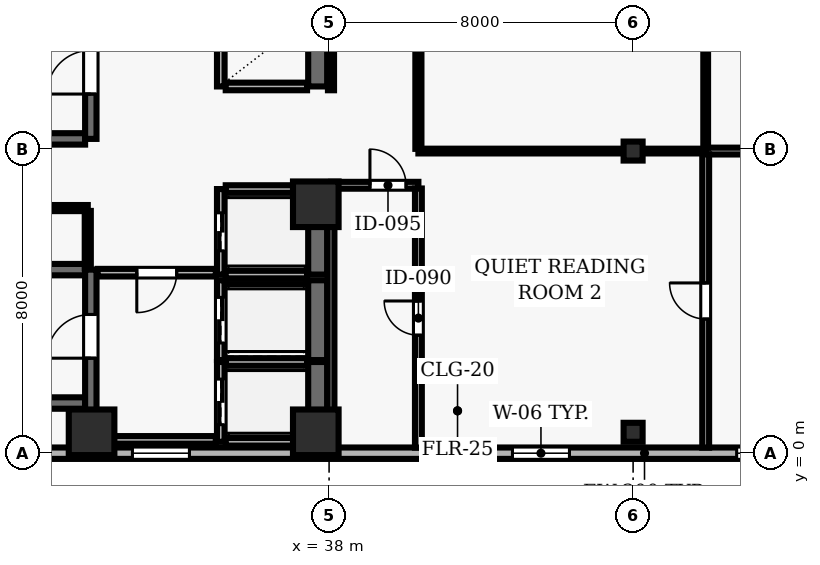
"""IFC4 building model, lengths in metres.
Left out: names, types, materials, properties, quantities, classifications, styles, units other than length and angle.
Written with IfcOpenShell. Run it as: python <this file> out.ifc"""

import sys

from ifc_helpers import new_model, si_unit, direction, frame, frame_2d, origin, origin_2d, place, context, subcontext, project, spatial, rectangle, hollow_rectangle, extrude, element, fill, save


model = new_model("IFC4")
c1 = context("Model", 3, precision=1e-05, world=origin(), true_north=direction((0.0, 1.0)))
c2 = subcontext(c1, "Body", "Model", "MODEL_VIEW")
j1 = project(units=[si_unit("LENGTHUNIT", "METRE"), si_unit("PLANEANGLEUNIT", "RADIAN")], contexts=[c1])
p1 = place(None, origin())
s1 = spatial("IfcSite", under=j1, at=p1, CompositionType="ELEMENT")
p2 = place(p1, origin())
s2 = spatial("IfcBuilding", under=s1, at=p2, CompositionType="ELEMENT")
p3 = place(p2, frame((0.0, 0.0, 122.9)))
s3 = spatial("IfcBuildingStorey", under=s2, at=p3, CompositionType="ELEMENT", Elevation=122.9)
for number, where, z_axis, x_axis in (
    (1, (31.75, 0.55, 0.0), (0.0, 0.0, 1.0), (1.0, 0.0, 0.0)),
    (2, (37.65, 0.55, 0.0), (0.0, 0.0, 1.0), (1.0, 0.0, 0.0)),
    (3, (37.65, 6.55, 0.0), (0.0, 0.0, 1.0), (1.0, 0.0, 0.0)),
):
    element("IfcColumn", number, at=place(p3, frame(where, z_axis=z_axis, x_axis=x_axis)), inside=s3, PredefinedType="COLUMN", context=c2, shape_type="SweptSolid", body=[
        extrude(rectangle(XDim=1.2, YDim=1.2, at=origin_2d()), origin(), (0.0, 0.0, 1.0), 3.9),
    ])
for number, where, z_axis, x_axis in (
    (4, (46.0, 0.55, 0.0), (0.0, 0.0, 1.0), (1.0, 0.0, 0.0)),
    (5, (46.0, 7.95, 0.0), (0.0, 0.0, 1.0), (1.0, 0.0, 0.0)),
):
    element("IfcColumn", number, at=place(p3, frame(where, z_axis=z_axis, x_axis=x_axis)), inside=s3, PredefinedType="COLUMN", context=c2, shape_type="SweptSolid", body=[
        extrude(hollow_rectangle(XDim=0.5, YDim=0.5, WallThickness=0.025, at=origin_2d()), origin(), (0.0, 0.0, 1.0), 3.9),
    ])
p4 = place(p3, frame((24.5, 0.0, 0.0), z_axis=(0.0, 0.0, 1.0), x_axis=(1.0, 0.0, 0.0)))
e6 = element("IfcWall", 6, at=p4, inside=s3, PredefinedType="SOLIDWALL", context=c2, shape_type="SweptSolid", body=[
    extrude(rectangle(XDim=43.6, YDim=0.3, at=frame_2d((21.8, 0.0))), origin(), (0.0, 0.0, 1.0), 3.69),
])
p5 = place(p4, frame((1.975, 0.0, 0.9)))
e7 = element("IfcOpeningElement", 7, at=p5, cuts=e6, PredefinedType="OPENING", context=c2, shape_type="SweptSolid", body=[
    extrude(rectangle(XDim=1.5, YDim=1.8, at=frame_2d((0.75, 0.9))), frame((0.0, 0.16, 0.0), z_axis=(0.0, -1.0, 0.0), x_axis=(1.0, 0.0, 0.0)), (0.0, 0.0, 1.0), 0.32),
])
p6 = place(p4, frame((8.325, 0.0, 0.9)))
e8 = element("IfcOpeningElement", 8, at=p6, cuts=e6, PredefinedType="OPENING", context=c2, shape_type="SweptSolid", body=[
    extrude(rectangle(XDim=1.5, YDim=1.8, at=frame_2d((0.75, 0.9))), frame((0.0, 0.16, 0.0), z_axis=(0.0, -1.0, 0.0), x_axis=(1.0, 0.0, 0.0)), (0.0, 0.0, 1.0), 0.32),
])
p7 = place(p4, frame((18.325, 0.0, 0.9)))
e9 = element("IfcOpeningElement", 9, at=p7, cuts=e6, PredefinedType="OPENING", context=c2, shape_type="SweptSolid", body=[
    extrude(rectangle(XDim=1.5, YDim=1.8, at=frame_2d((0.75, 0.9))), frame((0.0, 0.16, 0.0), z_axis=(0.0, -1.0, 0.0), x_axis=(1.0, 0.0, 0.0)), (0.0, 0.0, 1.0), 0.32),
])
p8 = place(p4, frame((24.225, 0.0, 0.9)))
e10 = element("IfcOpeningElement", 10, at=p8, cuts=e6, PredefinedType="OPENING", context=c2, shape_type="SweptSolid", body=[
    extrude(rectangle(XDim=1.5, YDim=1.8, at=frame_2d((0.75, 0.9))), frame((0.0, 0.16, 0.0), z_axis=(0.0, -1.0, 0.0), x_axis=(1.0, 0.0, 0.0)), (0.0, 0.0, 1.0), 0.32),
])
p9 = place(p4, frame((29.225, 0.0, 0.9)))
e11 = element("IfcOpeningElement", 11, at=p9, cuts=e6, PredefinedType="OPENING", context=c2, shape_type="SweptSolid", body=[
    extrude(rectangle(XDim=1.5, YDim=1.8, at=frame_2d((0.75, 0.9))), frame((0.0, 0.16, 0.0), z_axis=(0.0, -1.0, 0.0), x_axis=(1.0, 0.0, 0.0)), (0.0, 0.0, 1.0), 0.32),
])
p10 = place(p4, frame((34.675, 0.0, 0.9)))
e12 = element("IfcOpeningElement", 12, at=p10, cuts=e6, PredefinedType="OPENING", context=c2, shape_type="SweptSolid", body=[
    extrude(rectangle(XDim=1.5, YDim=1.8, at=frame_2d((0.75, 0.9))), frame((0.0, 0.16, 0.0), z_axis=(0.0, -1.0, 0.0), x_axis=(1.0, 0.0, 0.0)), (0.0, 0.0, 1.0), 0.32),
])
p11 = place(p4, frame((40.125, 0.0, 0.9)))
e13 = element("IfcOpeningElement", 13, at=p11, cuts=e6, PredefinedType="OPENING", context=c2, shape_type="SweptSolid", body=[
    extrude(rectangle(XDim=1.5, YDim=1.8, at=frame_2d((0.75, 0.9))), frame((0.0, 0.16, 0.0), z_axis=(0.0, -1.0, 0.0), x_axis=(1.0, 0.0, 0.0)), (0.0, 0.0, 1.0), 0.32),
])
for number, where, z_axis, x_axis in (
    (14, (31.58, 4.83, 0.0), (0.0, 0.0, 1.0), (-1.0, 0.0, 0.0)),
    (15, (23.22, 1.32, 0.0), (0.0, 0.0, 1.0), (1.0, 0.0, 0.0)),
):
    element("IfcWall", number, at=place(p3, frame(where, z_axis=z_axis, x_axis=x_axis)), inside=s3, PredefinedType="SHEAR", context=c2, shape_type="SweptSolid", body=[
        extrude(rectangle(XDim=8.36, YDim=0.3, at=frame_2d((4.18, 0.0))), origin(), (0.0, 0.0, 1.0), 3.69),
    ])
p12 = place(p3, frame((31.73, 0.96, 0.0), z_axis=(0.0, 0.0, 1.0), x_axis=(0.0, 1.0, 0.0)))
e16 = element("IfcWall", 16, at=p12, inside=s3, PredefinedType="SHEAR", context=c2, shape_type="SweptSolid", body=[
    extrude(rectangle(XDim=3.87, YDim=0.3, at=frame_2d((1.935, 0.0))), origin(), (0.0, 0.0, 1.0), 3.69),
])
p13 = place(p12, frame((1.54, 0.0, 0.0)))
e17 = element("IfcOpeningElement", 17, at=p13, cuts=e16, PredefinedType="OPENING", context=c2, shape_type="SweptSolid", body=[
    extrude(rectangle(XDim=1.15, YDim=2.15, at=frame_2d((0.575, 1.075))), frame((0.0, 0.16, 0.0), z_axis=(0.0, -1.0, 0.0), x_axis=(1.0, 0.0, 0.0)), (0.0, 0.0, 1.0), 0.32),
])
p14 = place(p3, frame((23.22, 8.27, 0.0), z_axis=(0.0, 0.0, 1.0), x_axis=(1.0, 0.0, 0.0)))
e18 = element("IfcWall", 18, at=p14, inside=s3, PredefinedType="SHEAR", context=c2, shape_type="SweptSolid", body=[
    extrude(rectangle(XDim=8.36, YDim=0.3, at=frame_2d((4.18, 0.0))), origin(), (0.0, 0.0, 1.0), 3.69),
])
p15 = place(p3, frame((31.73, 8.27, 0.0), z_axis=(0.0, 0.0, 1.0), x_axis=(0.0, 1.0, 0.0)))
e19 = element("IfcWall", 19, at=p15, inside=s3, PredefinedType="SHEAR", context=c2, shape_type="SweptSolid", body=[
    extrude(rectangle(XDim=3.51, YDim=0.3, at=frame_2d((1.755, 0.0))), origin(), (0.0, 0.0, 1.0), 3.69),
])
p16 = place(p15, frame((1.18, 0.0, 0.0)))
e20 = element("IfcOpeningElement", 20, at=p16, cuts=e19, PredefinedType="OPENING", context=c2, shape_type="SweptSolid", body=[
    extrude(rectangle(XDim=1.15, YDim=2.15, at=frame_2d((0.575, 1.075))), frame((0.0, 0.16, 0.0), z_axis=(0.0, -1.0, 0.0), x_axis=(1.0, 0.0, 0.0)), (0.0, 0.0, 1.0), 0.32),
])
p17 = place(p3, frame((35.15, 2.4, 0.0), z_axis=(0.0, 0.0, 1.0), x_axis=(0.0, -1.0, 0.0)))
e21 = element("IfcWall", 21, at=p17, inside=s3, PredefinedType="SOLIDWALL", context=c2, shape_type="SweptSolid", body=[
    extrude(rectangle(XDim=2.1, YDim=0.2, at=frame_2d((1.05, 0.0))), origin(), (0.0, 0.0, 1.0), 3.69),
])
p18 = place(p17, frame((0.45, 0.0, 0.0)))
e22 = element("IfcOpeningElement", 22, at=p18, cuts=e21, PredefinedType="OPENING", context=c2, shape_type="SweptSolid", body=[
    extrude(rectangle(XDim=1.2, YDim=2.15, at=frame_2d((0.6, 1.075))), frame((0.0, 0.11, 0.0), z_axis=(0.0, -1.0, 0.0), x_axis=(1.0, 0.0, 0.0)), (0.0, 0.0, 1.0), 0.22),
])
p19 = place(p3, frame((37.7, 0.3, 0.0), z_axis=(0.0, 0.0, 1.0), x_axis=(0.0, 1.0, 0.0)))
e23 = element("IfcWall", 23, at=p19, inside=s3, PredefinedType="SHEAR", context=c2, shape_type="SweptSolid", body=[
    extrude(rectangle(XDim=2.1, YDim=0.5, at=frame_2d((1.05, 0.0))), origin(), (0.0, 0.0, 1.0), 3.69),
])
for number, where, z_axis, x_axis in (
    (24, (35.28, 0.3, 0.0), (0.0, 0.0, 1.0), (1.0, 0.0, 0.0)),
    (25, (37.42, 2.4, 0.0), (0.0, 0.0, 1.0), (-1.0, 0.0, 0.0)),
):
    element("IfcWall", number, at=place(p3, frame(where, z_axis=z_axis, x_axis=x_axis)), inside=s3, PredefinedType="SOLIDWALL", context=c2, shape_type="SweptSolid", body=[
        extrude(rectangle(XDim=2.14, YDim=0.2, at=frame_2d((1.07, 0.0))), origin(), (0.0, 0.0, 1.0), 3.69),
    ])
p20 = place(p3, frame((35.15, 4.55, 0.0), z_axis=(0.0, 0.0, 1.0), x_axis=(0.0, -1.0, 0.0)))
e26 = element("IfcWall", 26, at=p20, inside=s3, PredefinedType="SOLIDWALL", context=c2, shape_type="SweptSolid", body=[
    extrude(rectangle(XDim=2.1, YDim=0.2, at=frame_2d((1.05, 0.0))), origin(), (0.0, 0.0, 1.0), 3.69),
])
p21 = place(p20, frame((0.45, 0.0, 0.0)))
e27 = element("IfcOpeningElement", 27, at=p21, cuts=e26, PredefinedType="OPENING", context=c2, shape_type="SweptSolid", body=[
    extrude(rectangle(XDim=1.2, YDim=2.15, at=frame_2d((0.6, 1.075))), frame((0.0, 0.11, 0.0), z_axis=(0.0, -1.0, 0.0), x_axis=(1.0, 0.0, 0.0)), (0.0, 0.0, 1.0), 0.22),
])
p22 = place(p3, frame((37.7, 2.45, 0.0), z_axis=(0.0, 0.0, 1.0), x_axis=(0.0, 1.0, 0.0)))
e28 = element("IfcWall", 28, at=p22, inside=s3, PredefinedType="SHEAR", context=c2, shape_type="SweptSolid", body=[
    extrude(rectangle(XDim=2.1, YDim=0.5, at=frame_2d((1.05, 0.0))), origin(), (0.0, 0.0, 1.0), 3.69),
])
p23 = place(p3, frame((37.42, 4.55, 0.0), z_axis=(0.0, 0.0, 1.0), x_axis=(-1.0, 0.0, 0.0)))
e29 = element("IfcWall", 29, at=p23, inside=s3, PredefinedType="SOLIDWALL", context=c2, shape_type="SweptSolid", body=[
    extrude(rectangle(XDim=2.14, YDim=0.2, at=frame_2d((1.07, 0.0))), origin(), (0.0, 0.0, 1.0), 3.69),
])
p24 = place(p3, frame((35.15, 6.95, 0.0), z_axis=(0.0, 0.0, 1.0), x_axis=(0.0, -1.0, 0.0)))
e30 = element("IfcWall", 30, at=p24, inside=s3, PredefinedType="SOLIDWALL", context=c2, shape_type="SweptSolid", body=[
    extrude(rectangle(XDim=2.25, YDim=0.2, at=frame_2d((1.125, 0.0))), origin(), (0.0, 0.0, 1.0), 3.69),
])
p25 = place(p24, frame((0.625, 0.0, 0.0)))
e31 = element("IfcOpeningElement", 31, at=p25, cuts=e30, PredefinedType="OPENING", context=c2, shape_type="SweptSolid", body=[
    extrude(rectangle(XDim=1.0, YDim=2.1, at=frame_2d((0.5, 1.05))), frame((0.0, 0.11, 0.0), z_axis=(0.0, -1.0, 0.0), x_axis=(1.0, 0.0, 0.0)), (0.0, 0.0, 1.0), 0.22),
])
p26 = place(p3, frame((37.7, 4.7, 0.0), z_axis=(0.0, 0.0, 1.0), x_axis=(0.0, 1.0, 0.0)))
e32 = element("IfcWall", 32, at=p26, inside=s3, PredefinedType="SHEAR", context=c2, shape_type="SweptSolid", body=[
    extrude(rectangle(XDim=2.25, YDim=0.5, at=frame_2d((1.125, 0.0))), origin(), (0.0, 0.0, 1.0), 3.69),
])
for number, where, z_axis, x_axis in (
    (33, (35.28, 4.7, 0.0), (0.0, 0.0, 1.0), (1.0, 0.0, 0.0)),
    (34, (37.42, 6.95, 0.0), (0.0, 0.0, 1.0), (-1.0, 0.0, 0.0)),
):
    element("IfcWall", number, at=place(p3, frame(where, z_axis=z_axis, x_axis=x_axis)), inside=s3, PredefinedType="SOLIDWALL", context=c2, shape_type="SweptSolid", body=[
        extrude(rectangle(XDim=2.14, YDim=0.2, at=frame_2d((1.07, 0.0))), origin(), (0.0, 0.0, 1.0), 3.69),
    ])
p27 = place(p3, frame((35.15, 11.55, 0.0), z_axis=(0.0, 0.0, 1.0), x_axis=(0.0, -1.0, 0.0)))
e35 = element("IfcWall", 35, at=p27, inside=s3, PredefinedType="SOLIDWALL", context=c2, shape_type="SweptSolid", body=[
    extrude(rectangle(XDim=1.9, YDim=0.2, at=frame_2d((0.95, 0.0))), origin(), (0.0, 0.0, 1.0), 3.69),
])
p28 = place(p3, frame((37.7, 9.65, 0.0), z_axis=(0.0, 0.0, 1.0), x_axis=(0.0, 1.0, 0.0)))
e36 = element("IfcWall", 36, at=p28, inside=s3, PredefinedType="SHEAR", context=c2, shape_type="SweptSolid", body=[
    extrude(rectangle(XDim=1.9, YDim=0.5, at=frame_2d((0.95, 0.0))), origin(), (0.0, 0.0, 1.0), 3.69),
])
p29 = place(p3, frame((35.28, 9.65, 0.0), z_axis=(0.0, 0.0, 1.0), x_axis=(1.0, 0.0, 0.0)))
e37 = element("IfcWall", 37, at=p29, inside=s3, PredefinedType="SOLIDWALL", context=c2, shape_type="SweptSolid", body=[
    extrude(rectangle(XDim=2.14, YDim=0.2, at=frame_2d((1.07, 0.0))), origin(), (0.0, 0.0, 1.0), 3.69),
])
p30 = place(p3, frame((28.55, 6.45, 0.0), z_axis=(0.0, 0.0, 1.0), x_axis=(1.0, 0.0, 0.0)))
e38 = element("IfcWall", 38, at=p30, inside=s3, PredefinedType="PARTITIONING", context=c2, shape_type="SweptSolid", body=[
    extrude(rectangle(XDim=3.1, YDim=0.16, at=frame_2d((1.55, 0.0))), origin(), (0.0, 0.0, 1.0), 3.69),
])
p31 = place(p30, frame((1.11, 0.0, 0.0)))
e39 = element("IfcOpeningElement", 39, at=p31, cuts=e38, PredefinedType="OPENING", context=c2, shape_type="SweptSolid", body=[
    extrude(rectangle(XDim=0.88, YDim=2.1, at=frame_2d((0.44, 1.05))), frame((0.0, 0.09, 0.0), z_axis=(0.0, -1.0, 0.0), x_axis=(1.0, 0.0, 0.0)), (0.0, 0.0, 1.0), 0.18),
])
p32 = place(p3, frame((31.65, 0.35, 0.0), z_axis=(0.0, 0.0, 1.0), x_axis=(1.0, 0.0, 0.0)))
e40 = element("IfcWall", 40, at=p32, inside=s3, PredefinedType="SOLIDWALL", context=c2, shape_type="SweptSolid", body=[
    extrude(rectangle(XDim=3.37, YDim=0.2, at=frame_2d((1.685, 0.0))), origin(), (0.0, 0.0, 1.0), 3.69),
])
p33 = place(p3, frame((35.02, 4.75, 0.0), z_axis=(0.0, 0.0, 1.0), x_axis=(-1.0, 0.0, 0.0)))
e41 = element("IfcWall", 41, at=p33, inside=s3, PredefinedType="SOLIDWALL", context=c2, shape_type="SweptSolid", body=[
    extrude(rectangle(XDim=3.11, YDim=0.2, at=frame_2d((1.555, 0.0))), origin(), (0.0, 0.0, 1.0), 3.69),
])
p34 = place(p33, frame((1.03, 0.0, 0.0)))
e42 = element("IfcOpeningElement", 42, at=p34, cuts=e41, PredefinedType="OPENING", context=c2, shape_type="SweptSolid", body=[
    extrude(rectangle(XDim=1.05, YDim=2.15, at=frame_2d((0.525, 1.075))), frame((0.0, 0.11, 0.0), z_axis=(0.0, -1.0, 0.0), x_axis=(1.0, 0.0, 0.0)), (0.0, 0.0, 1.0), 0.22),
])
p35 = place(p3, frame((38.05, 7.05, 0.0), z_axis=(0.0, 0.0, 1.0), x_axis=(1.0, 0.0, 0.0)))
e43 = element("IfcWall", 43, at=p35, inside=s3, PredefinedType="PARTITIONING", context=c2, shape_type="SweptSolid", body=[
    extrude(rectangle(XDim=2.3, YDim=0.18, at=frame_2d((1.15, 0.0))), origin(), (0.0, 0.0, 1.0), 3.69),
])
p36 = place(p35, frame((1.025, 0.0, 0.0)))
e44 = element("IfcOpeningElement", 44, at=p36, cuts=e43, PredefinedType="OPENING", context=c2, shape_type="SweptSolid", body=[
    extrude(rectangle(XDim=0.95, YDim=2.1, at=frame_2d((0.475, 1.05))), frame((0.0, 0.1, 0.0), z_axis=(0.0, -1.0, 0.0), x_axis=(1.0, 0.0, 0.0)), (0.0, 0.0, 1.0), 0.2),
])
p37 = place(p3, frame((47.91, 7.95, 0.0), z_axis=(0.0, 0.0, 1.0), x_axis=(-1.0, 0.0, 0.0)))
e45 = element("IfcWall", 45, at=p37, inside=s3, PredefinedType="PARTITIONING", context=c2, shape_type="SweptSolid", body=[
    extrude(rectangle(XDim=7.56, YDim=0.125, at=frame_2d((3.78, 0.0))), origin(), (0.0, 0.0, 1.0), 3.073),
])
p38 = place(p3, frame((56.08, 7.95, 0.0), z_axis=(0.0, 0.0, 1.0), x_axis=(-1.0, 0.0, 0.0)))
e46 = element("IfcWall", 46, at=p38, inside=s3, PredefinedType="PARTITIONING", context=c2, shape_type="SweptSolid", body=[
    extrude(rectangle(XDim=8.17, YDim=0.18, at=frame_2d((4.085, 0.0))), origin(), (0.0, 0.0, 1.0), 3.073),
])
p39 = place(p3, frame((31.65, 4.86, 0.0), z_axis=(0.0, 0.0, 1.0), x_axis=(0.0, 1.0, 0.0)))
e47 = element("IfcWall", 47, at=p39, inside=s3, PredefinedType="PARTITIONING", context=c2, shape_type="SweptSolid", body=[
    extrude(rectangle(XDim=1.515, YDim=0.16, at=frame_2d((0.757, 0.0))), origin(), (0.0, 0.0, 1.0), 3.69),
])
p40 = place(p3, frame((38.05, 6.965, 0.0), z_axis=(0.0, 0.0, 1.0), x_axis=(0.0, -1.0, 0.0)))
e48 = element("IfcWall", 48, at=p40, inside=s3, PredefinedType="PARTITIONING", context=c2, shape_type="SweptSolid", body=[
    extrude(rectangle(XDim=6.82, YDim=0.18, at=frame_2d((3.41, 0.0))), origin(), (0.0, 0.0, 1.0), 3.073),
])
p41 = place(p3, frame((38.05, 15.925, 0.0), z_axis=(0.0, 0.0, 1.0), x_axis=(0.0, -1.0, 0.0)))
e49 = element("IfcWall", 49, at=p41, inside=s3, PredefinedType="PARTITIONING", context=c2, shape_type="SweptSolid", body=[
    extrude(rectangle(XDim=6.375, YDim=0.16, at=frame_2d((3.188, 0.0))), origin(), (0.0, 0.0, 1.0), 3.073),
])
p42 = place(p3, frame((40.35, 0.145, 0.0), z_axis=(0.0, 0.0, 1.0), x_axis=(0.0, 1.0, 0.0)))
e50 = element("IfcWall", 50, at=p42, inside=s3, PredefinedType="PARTITIONING", context=c2, shape_type="SweptSolid", body=[
    extrude(rectangle(XDim=6.82, YDim=0.18, at=frame_2d((3.41, 0.0))), origin(), (0.0, 0.0, 1.0), 3.69),
])
p43 = place(p42, frame((2.96, 0.0, 0.0)))
e51 = element("IfcOpeningElement", 51, at=p43, cuts=e50, PredefinedType="OPENING", context=c2, shape_type="SweptSolid", body=[
    extrude(rectangle(XDim=0.9, YDim=2.1, at=frame_2d((0.45, 1.05))), frame((0.0, 0.1, 0.0), z_axis=(0.0, -1.0, 0.0), x_axis=(1.0, 0.0, 0.0)), (0.0, 0.0, 1.0), 0.2),
])
p44 = place(p3, frame((40.35, 8.008, 0.0), z_axis=(0.0, 0.0, 1.0), x_axis=(0.0, 1.0, 0.0)))
e52 = element("IfcWall", 52, at=p44, inside=s3, PredefinedType="PARTITIONING", context=c2, shape_type="SweptSolid", body=[
    extrude(rectangle(XDim=5.567, YDim=0.16, at=frame_2d((2.783, 0.0))), origin(), (0.0, 0.0, 1.0), 3.69),
])
p45 = place(p3, frame((47.91, 0.145, 0.0), z_axis=(0.0, 0.0, 1.0), x_axis=(0.0, 1.0, 0.0)))
e53 = element("IfcWall", 53, at=p45, inside=s3, PredefinedType="PARTITIONING", context=c2, shape_type="SweptSolid", body=[
    extrude(rectangle(XDim=7.72, YDim=0.18, at=frame_2d((3.86, 0.0))), origin(), (0.0, 0.0, 1.0), 3.69),
])
p46 = place(p45, frame((3.385, 0.0, 0.0)))
e54 = element("IfcOpeningElement", 54, at=p46, cuts=e53, PredefinedType="OPENING", context=c2, shape_type="SweptSolid", body=[
    extrude(rectangle(XDim=0.95, YDim=2.1, at=frame_2d((0.475, 1.05))), frame((0.0, 0.1, 0.0), z_axis=(0.0, -1.0, 0.0), x_axis=(1.0, 0.0, 0.0)), (0.0, 0.0, 1.0), 0.2),
])
p47 = place(p3, frame((47.91, 8.035, 0.0), z_axis=(0.0, 0.0, 1.0), x_axis=(0.0, 1.0, 0.0)))
e55 = element("IfcWall", 55, at=p47, inside=s3, PredefinedType="PARTITIONING", context=c2, shape_type="SweptSolid", body=[
    extrude(rectangle(XDim=5.54, YDim=0.125, at=frame_2d((2.77, 0.0))), origin(), (0.0, 0.0, 1.0), 3.69),
])
p48 = place(p6, origin())
e56 = element("IfcWindow", 56, at=p48, inside=s3, PartitioningType="SINGLE_PANEL", PredefinedType="WINDOW", context=c2, shape_type="SweptSolid", body=[
    extrude(rectangle(XDim=1.5, YDim=1.8, at=frame_2d((0.75, 0.9))), frame((0.0, 0.03, 0.0), z_axis=(0.0, -1.0, 0.0), x_axis=(1.0, 0.0, 0.0)), (0.0, 0.0, 1.0), 0.06),
])
fill(e8, e56)
p49 = place(p7, origin())
e57 = element("IfcWindow", 57, at=p49, inside=s3, PartitioningType="SINGLE_PANEL", PredefinedType="WINDOW", context=c2, shape_type="SweptSolid", body=[
    extrude(rectangle(XDim=1.5, YDim=1.8, at=frame_2d((0.75, 0.9))), frame((0.0, 0.03, 0.0), z_axis=(0.0, -1.0, 0.0), x_axis=(1.0, 0.0, 0.0)), (0.0, 0.0, 1.0), 0.06),
])
fill(e9, e57)
p50 = place(p8, origin())
e58 = element("IfcWindow", 58, at=p50, inside=s3, PartitioningType="SINGLE_PANEL", PredefinedType="WINDOW", context=c2, shape_type="SweptSolid", body=[
    extrude(rectangle(XDim=1.5, YDim=1.8, at=frame_2d((0.75, 0.9))), frame((0.0, 0.03, 0.0), z_axis=(0.0, -1.0, 0.0), x_axis=(1.0, 0.0, 0.0)), (0.0, 0.0, 1.0), 0.06),
])
fill(e10, e58)
p51 = place(p13, origin())
e59 = element("IfcDoor", 59, at=p51, inside=s3, OperationType="SINGLE_SWING_LEFT", PredefinedType="DOOR", context=c2, shape_type="SweptSolid", body=[
    extrude(rectangle(XDim=1.15, YDim=2.15, at=frame_2d((0.575, 1.075))), frame((0.0, 0.025, 0.0), z_axis=(0.0, -1.0, 0.0), x_axis=(1.0, 0.0, 0.0)), (0.0, 0.0, 1.0), 0.05),
])
fill(e17, e59)
p52 = place(p16, origin())
e60 = element("IfcDoor", 60, at=p52, inside=s3, OperationType="SINGLE_SWING_LEFT", PredefinedType="DOOR", context=c2, shape_type="SweptSolid", body=[
    extrude(rectangle(XDim=1.15, YDim=2.15, at=frame_2d((0.575, 1.075))), frame((0.0, 0.025, 0.0), z_axis=(0.0, -1.0, 0.0), x_axis=(1.0, 0.0, 0.0)), (0.0, 0.0, 1.0), 0.05),
])
fill(e20, e60)
p53 = place(p18, origin())
e61 = element("IfcDoor", 61, at=p53, inside=s3, OperationType="DOUBLE_DOOR_SLIDING", PredefinedType="DOOR", context=c2, shape_type="SweptSolid", body=[
    extrude(rectangle(XDim=1.2, YDim=2.15, at=frame_2d((0.6, 1.075))), frame((0.0, 0.025, 0.0), z_axis=(0.0, -1.0, 0.0), x_axis=(1.0, 0.0, 0.0)), (0.0, 0.0, 1.0), 0.05),
])
fill(e22, e61)
p54 = place(p21, origin())
e62 = element("IfcDoor", 62, at=p54, inside=s3, OperationType="DOUBLE_DOOR_SLIDING", PredefinedType="DOOR", context=c2, shape_type="SweptSolid", body=[
    extrude(rectangle(XDim=1.2, YDim=2.15, at=frame_2d((0.6, 1.075))), frame((0.0, 0.025, 0.0), z_axis=(0.0, -1.0, 0.0), x_axis=(1.0, 0.0, 0.0)), (0.0, 0.0, 1.0), 0.05),
])
fill(e27, e62)
p55 = place(p25, origin())
e63 = element("IfcDoor", 63, at=p55, inside=s3, OperationType="DOUBLE_DOOR_SLIDING", PredefinedType="DOOR", context=c2, shape_type="SweptSolid", body=[
    extrude(rectangle(XDim=1.0, YDim=2.1, at=frame_2d((0.5, 1.05))), frame((0.0, 0.025, 0.0), z_axis=(0.0, -1.0, 0.0), x_axis=(1.0, 0.0, 0.0)), (0.0, 0.0, 1.0), 0.05),
])
fill(e31, e63)
p56 = place(p34, origin())
e64 = element("IfcDoor", 64, at=p56, inside=s3, OperationType="SINGLE_SWING_RIGHT", PredefinedType="DOOR", context=c2, shape_type="SweptSolid", body=[
    extrude(rectangle(XDim=1.05, YDim=2.15, at=frame_2d((0.525, 1.075))), frame((0.0, 0.025, 0.0), z_axis=(0.0, -1.0, 0.0), x_axis=(1.0, 0.0, 0.0)), (0.0, 0.0, 1.0), 0.05),
])
fill(e42, e64)
p57 = place(p36, origin())
e65 = element("IfcDoor", 65, at=p57, inside=s3, OperationType="SINGLE_SWING_LEFT", PredefinedType="DOOR", context=c2, shape_type="SweptSolid", body=[
    extrude(rectangle(XDim=0.95, YDim=2.1, at=frame_2d((0.475, 1.05))), frame((0.0, 0.025, 0.0), z_axis=(0.0, -1.0, 0.0), x_axis=(1.0, 0.0, 0.0)), (0.0, 0.0, 1.0), 0.05),
])
fill(e44, e65)
p58 = place(p43, origin())
e66 = element("IfcDoor", 66, at=p58, inside=s3, OperationType="SINGLE_SWING_RIGHT", PredefinedType="DOOR", context=c2, shape_type="SweptSolid", body=[
    extrude(rectangle(XDim=0.9, YDim=2.1, at=frame_2d((0.45, 1.05))), frame((0.0, 0.025, 0.0), z_axis=(0.0, -1.0, 0.0), x_axis=(1.0, 0.0, 0.0)), (0.0, 0.0, 1.0), 0.05),
])
fill(e51, e66)
p59 = place(p46, origin())
e67 = element("IfcDoor", 67, at=p59, inside=s3, OperationType="SINGLE_SWING_RIGHT", PredefinedType="DOOR", context=c2, shape_type="SweptSolid", body=[
    extrude(rectangle(XDim=0.95, YDim=2.1, at=frame_2d((0.475, 1.05))), frame((0.0, 0.025, 0.0), z_axis=(0.0, -1.0, 0.0), x_axis=(1.0, 0.0, 0.0)), (0.0, 0.0, 1.0), 0.05),
])
fill(e54, e67)
save(model, sys.argv[1])
